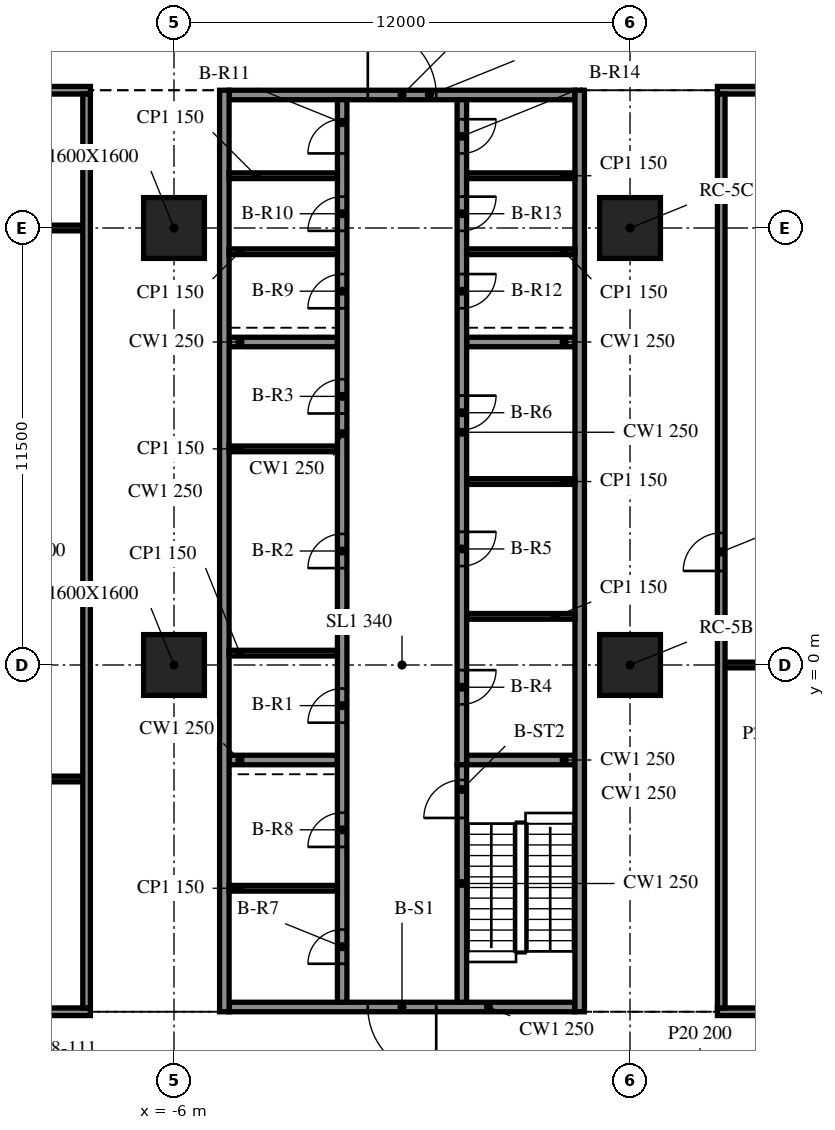
"""IFC4 building model, lengths in metres.
Left out: names, types, materials, properties, quantities, classifications, styles, units other than length and angle.
Written with IfcOpenShell. Run it as: python <this file> out.ifc"""

import sys

from ifc_helpers import new_model, si_unit, direction, frame, frame_2d, origin, origin_2d, place, context, subcontext, project, spatial, rectangle, extrude, element, fill, save


model = new_model("IFC4")
c1 = context("Model", 3, precision=1e-05, world=origin(), true_north=direction((0.0, 1.0)))
c2 = subcontext(c1, "Body", "Model", "MODEL_VIEW")
j1 = project(units=[si_unit("LENGTHUNIT", "METRE"), si_unit("PLANEANGLEUNIT", "RADIAN")], contexts=[c1])
p1 = place(None, origin())
s1 = spatial("IfcSite", under=j1, at=p1, CompositionType="ELEMENT")
p2 = place(p1, origin())
s2 = spatial("IfcBuilding", under=s1, at=p2, CompositionType="ELEMENT")
p3 = place(p2, frame((0.0, 0.0, 37.3)))
s3 = spatial("IfcBuildingStorey", under=s2, at=p3, CompositionType="ELEMENT", Elevation=37.3)
for number, where, z_axis, x_axis in (
    (1, (-6.0, 0.0, -0.34), (0.0, 0.0, 1.0), (1.0, 0.0, 0.0)),
    (2, (-6.0, 11.5, -0.34), (0.0, 0.0, 1.0), (1.0, 0.0, 0.0)),
    (3, (6.0, 0.0, -0.34), (0.0, 0.0, 1.0), (1.0, 0.0, 0.0)),
    (4, (6.0, 11.5, -0.34), (0.0, 0.0, 1.0), (1.0, 0.0, 0.0)),
):
    element("IfcColumn", number, at=place(p3, frame(where, z_axis=z_axis, x_axis=x_axis)), inside=s3, PredefinedType="COLUMN", context=c2, shape_type="SweptSolid", body=[
        extrude(rectangle(XDim=1.6, YDim=1.6, at=origin_2d()), origin(), (0.0, 0.0, 1.0), 4.09),
    ])
for number, where, z_axis, x_axis in (
    (5, (-4.675, 15.125, 0.0), (0.0, 0.0, 1.0), (0.0, -1.0, 0.0)),
    (6, (4.675, -9.125, 0.0), (0.0, 0.0, 1.0), (0.0, 1.0, 0.0)),
):
    element("IfcWall", number, at=place(p3, frame(where, z_axis=z_axis, x_axis=x_axis)), inside=s3, PredefinedType="SOLIDWALL", context=c2, shape_type="SweptSolid", body=[
        extrude(rectangle(XDim=24.25, YDim=0.25, at=frame_2d((12.125, 0.0))), origin(), (0.0, 0.0, 1.0), 3.75),
    ])
p4 = place(p3, frame((4.55, -9.0, 0.0), z_axis=(0.0, 0.0, 1.0), x_axis=(-1.0, 0.0, 0.0)))
e7 = element("IfcWall", 7, at=p4, inside=s3, PredefinedType="SOLIDWALL", context=c2, shape_type="SweptSolid", body=[
    extrude(rectangle(XDim=9.1, YDim=0.25, at=frame_2d((4.55, 0.0))), origin(), (0.0, 0.0, 1.0), 3.75),
])
p5 = place(p4, frame((3.65, 0.0, 0.0)))
e8 = element("IfcOpeningElement", 8, at=p5, cuts=e7, PredefinedType="OPENING", context=c2, shape_type="SweptSolid", body=[
    extrude(rectangle(XDim=1.8, YDim=2.1, at=frame_2d((0.9, 1.05))), frame((0.0, 0.135, 0.0), z_axis=(0.0, -1.0, 0.0), x_axis=(1.0, 0.0, 0.0)), (0.0, 0.0, 1.0), 0.27),
])
p6 = place(p3, frame((-4.55, 15.0, 0.0), z_axis=(0.0, 0.0, 1.0), x_axis=(1.0, 0.0, 0.0)))
e9 = element("IfcWall", 9, at=p6, inside=s3, PredefinedType="SOLIDWALL", context=c2, shape_type="SweptSolid", body=[
    extrude(rectangle(XDim=9.1, YDim=0.25, at=frame_2d((4.55, 0.0))), origin(), (0.0, 0.0, 1.0), 3.75),
])
p7 = place(p6, frame((3.65, 0.0, 0.0)))
e10 = element("IfcOpeningElement", 10, at=p7, cuts=e9, PredefinedType="OPENING", context=c2, shape_type="SweptSolid", body=[
    extrude(rectangle(XDim=1.8, YDim=2.1, at=frame_2d((0.9, 1.05))), frame((0.0, 0.135, 0.0), z_axis=(0.0, -1.0, 0.0), x_axis=(1.0, 0.0, 0.0)), (0.0, 0.0, 1.0), 0.27),
])
p8 = place(p3, frame((-1.575, -8.875, 0.0), z_axis=(0.0, 0.0, 1.0), x_axis=(0.0, 1.0, 0.0)))
e11 = element("IfcWall", 11, at=p8, inside=s3, PredefinedType="SOLIDWALL", context=c2, shape_type="SweptSolid", body=[
    extrude(rectangle(XDim=23.75, YDim=0.25, at=frame_2d((11.875, 0.0))), origin(), (0.0, 0.0, 1.0), 3.75),
])
p9 = place(p8, frame((7.356, 0.0, 0.0)))
e12 = element("IfcOpeningElement", 12, at=p9, cuts=e11, PredefinedType="OPENING", context=c2, shape_type="SweptSolid", body=[
    extrude(rectangle(XDim=0.9, YDim=2.1, at=frame_2d((0.45, 1.05))), frame((0.0, 0.135, 0.0), z_axis=(0.0, -1.0, 0.0), x_axis=(1.0, 0.0, 0.0)), (0.0, 0.0, 1.0), 0.27),
])
p10 = place(p8, frame((11.425, 0.0, 0.0)))
e13 = element("IfcOpeningElement", 13, at=p10, cuts=e11, PredefinedType="OPENING", context=c2, shape_type="SweptSolid", body=[
    extrude(rectangle(XDim=0.9, YDim=2.1, at=frame_2d((0.45, 1.05))), frame((0.0, 0.135, 0.0), z_axis=(0.0, -1.0, 0.0), x_axis=(1.0, 0.0, 0.0)), (0.0, 0.0, 1.0), 0.27),
])
p11 = place(p8, frame((15.494, 0.0, 0.0)))
e14 = element("IfcOpeningElement", 14, at=p11, cuts=e11, PredefinedType="OPENING", context=c2, shape_type="SweptSolid", body=[
    extrude(rectangle(XDim=0.9, YDim=2.1, at=frame_2d((0.45, 1.05))), frame((0.0, 0.135, 0.0), z_axis=(0.0, -1.0, 0.0), x_axis=(1.0, 0.0, 0.0)), (0.0, 0.0, 1.0), 0.27),
])
p12 = place(p8, frame((1.012, 0.0, 0.0)))
e15 = element("IfcOpeningElement", 15, at=p12, cuts=e11, PredefinedType="OPENING", context=c2, shape_type="SweptSolid", body=[
    extrude(rectangle(XDim=0.9, YDim=2.1, at=frame_2d((0.45, 1.05))), frame((0.0, 0.135, 0.0), z_axis=(0.0, -1.0, 0.0), x_axis=(1.0, 0.0, 0.0)), (0.0, 0.0, 1.0), 0.27),
])
p13 = place(p8, frame((4.087, 0.0, 0.0)))
e16 = element("IfcOpeningElement", 16, at=p13, cuts=e11, PredefinedType="OPENING", context=c2, shape_type="SweptSolid", body=[
    extrude(rectangle(XDim=0.9, YDim=2.1, at=frame_2d((0.45, 1.05))), frame((0.0, 0.135, 0.0), z_axis=(0.0, -1.0, 0.0), x_axis=(1.0, 0.0, 0.0)), (0.0, 0.0, 1.0), 0.27),
])
p14 = place(p8, frame((18.262, 0.0, 0.0)))
e17 = element("IfcOpeningElement", 17, at=p14, cuts=e11, PredefinedType="OPENING", context=c2, shape_type="SweptSolid", body=[
    extrude(rectangle(XDim=0.9, YDim=2.1, at=frame_2d((0.45, 1.05))), frame((0.0, 0.135, 0.0), z_axis=(0.0, -1.0, 0.0), x_axis=(1.0, 0.0, 0.0)), (0.0, 0.0, 1.0), 0.27),
])
p15 = place(p8, frame((20.3, 0.0, 0.0)))
e18 = element("IfcOpeningElement", 18, at=p15, cuts=e11, PredefinedType="OPENING", context=c2, shape_type="SweptSolid", body=[
    extrude(rectangle(XDim=0.9, YDim=2.1, at=frame_2d((0.45, 1.05))), frame((0.0, 0.135, 0.0), z_axis=(0.0, -1.0, 0.0), x_axis=(1.0, 0.0, 0.0)), (0.0, 0.0, 1.0), 0.27),
])
p16 = place(p8, frame((22.337, 0.0, 0.0)))
e19 = element("IfcOpeningElement", 19, at=p16, cuts=e11, PredefinedType="OPENING", context=c2, shape_type="SweptSolid", body=[
    extrude(rectangle(XDim=0.9, YDim=2.1, at=frame_2d((0.45, 1.05))), frame((0.0, 0.135, 0.0), z_axis=(0.0, -1.0, 0.0), x_axis=(1.0, 0.0, 0.0)), (0.0, 0.0, 1.0), 0.27),
])
p17 = place(p3, frame((1.575, -8.875, 0.0), z_axis=(0.0, 0.0, 1.0), x_axis=(0.0, 1.0, 0.0)))
e20 = element("IfcWall", 20, at=p17, inside=s3, PredefinedType="SOLIDWALL", context=c2, shape_type="SweptSolid", body=[
    extrude(rectangle(XDim=6.25, YDim=0.25, at=frame_2d((3.125, 0.0))), origin(), (0.0, 0.0, 1.0), 3.75),
])
p18 = place(p17, frame((4.85, 0.0, 0.0)))
e21 = element("IfcOpeningElement", 21, at=p18, cuts=e20, PredefinedType="OPENING", context=c2, shape_type="SweptSolid", body=[
    extrude(rectangle(XDim=1.0, YDim=2.1, at=frame_2d((0.5, 1.05))), frame((0.0, 0.135, 0.0), z_axis=(0.0, -1.0, 0.0), x_axis=(1.0, 0.0, 0.0)), (0.0, 0.0, 1.0), 0.27),
])
p19 = place(p3, frame((1.575, 14.875, 0.0), z_axis=(0.0, 0.0, 1.0), x_axis=(0.0, -1.0, 0.0)))
e22 = element("IfcWall", 22, at=p19, inside=s3, PredefinedType="SOLIDWALL", context=c2, shape_type="SweptSolid", body=[
    extrude(rectangle(XDim=17.5, YDim=0.25, at=frame_2d((8.75, 0.0))), origin(), (0.0, 0.0, 1.0), 3.75),
])
p20 = place(p19, frame((15.01, 0.0, 0.0)))
e23 = element("IfcOpeningElement", 23, at=p20, cuts=e22, PredefinedType="OPENING", context=c2, shape_type="SweptSolid", body=[
    extrude(rectangle(XDim=0.9, YDim=2.1, at=frame_2d((0.45, 1.05))), frame((0.0, 0.135, 0.0), z_axis=(0.0, -1.0, 0.0), x_axis=(1.0, 0.0, 0.0)), (0.0, 0.0, 1.0), 0.27),
])
p21 = place(p19, frame((11.371, 0.0, 0.0)))
e24 = element("IfcOpeningElement", 24, at=p21, cuts=e22, PredefinedType="OPENING", context=c2, shape_type="SweptSolid", body=[
    extrude(rectangle(XDim=0.9, YDim=2.1, at=frame_2d((0.45, 1.05))), frame((0.0, 0.135, 0.0), z_axis=(0.0, -1.0, 0.0), x_axis=(1.0, 0.0, 0.0)), (0.0, 0.0, 1.0), 0.27),
])
p22 = place(p19, frame((7.786, 0.0, 0.0)))
e25 = element("IfcOpeningElement", 25, at=p22, cuts=e22, PredefinedType="OPENING", context=c2, shape_type="SweptSolid", body=[
    extrude(rectangle(XDim=0.9, YDim=2.1, at=frame_2d((0.45, 1.05))), frame((0.0, 0.135, 0.0), z_axis=(0.0, -1.0, 0.0), x_axis=(1.0, 0.0, 0.0)), (0.0, 0.0, 1.0), 0.27),
])
p23 = place(p19, frame((4.587, 0.0, 0.0)))
e26 = element("IfcOpeningElement", 26, at=p23, cuts=e22, PredefinedType="OPENING", context=c2, shape_type="SweptSolid", body=[
    extrude(rectangle(XDim=0.9, YDim=2.1, at=frame_2d((0.45, 1.05))), frame((0.0, 0.135, 0.0), z_axis=(0.0, -1.0, 0.0), x_axis=(1.0, 0.0, 0.0)), (0.0, 0.0, 1.0), 0.27),
])
p24 = place(p19, frame((2.55, 0.0, 0.0)))
e27 = element("IfcOpeningElement", 27, at=p24, cuts=e22, PredefinedType="OPENING", context=c2, shape_type="SweptSolid", body=[
    extrude(rectangle(XDim=0.9, YDim=2.1, at=frame_2d((0.45, 1.05))), frame((0.0, 0.135, 0.0), z_axis=(0.0, -1.0, 0.0), x_axis=(1.0, 0.0, 0.0)), (0.0, 0.0, 1.0), 0.27),
])
p25 = place(p19, frame((0.512, 0.0, 0.0)))
e28 = element("IfcOpeningElement", 28, at=p25, cuts=e22, PredefinedType="OPENING", context=c2, shape_type="SweptSolid", body=[
    extrude(rectangle(XDim=0.9, YDim=2.1, at=frame_2d((0.45, 1.05))), frame((0.0, 0.135, 0.0), z_axis=(0.0, -1.0, 0.0), x_axis=(1.0, 0.0, 0.0)), (0.0, 0.0, 1.0), 0.27),
])
for number, where, z_axis, x_axis in (
    (29, (-4.55, -2.5, 0.0), (0.0, 0.0, 1.0), (1.0, 0.0, 0.0)),
    (30, (-4.55, 8.5, 0.0), (0.0, 0.0, 1.0), (1.0, 0.0, 0.0)),
    (31, (1.7, -2.5, 0.0), (0.0, 0.0, 1.0), (1.0, 0.0, 0.0)),
    (32, (1.7, 8.5, 0.0), (0.0, 0.0, 1.0), (1.0, 0.0, 0.0)),
):
    element("IfcWall", number, at=place(p3, frame(where, z_axis=z_axis, x_axis=x_axis)), inside=s3, PredefinedType="SOLIDWALL", context=c2, shape_type="SweptSolid", body=[
        extrude(rectangle(XDim=2.85, YDim=0.25, at=frame_2d((1.425, 0.0))), origin(), (0.0, 0.0, 1.0), 3.75),
    ])
for number, where, z_axis, x_axis in (
    (33, (-4.55, 0.312, 0.0), (0.0, 0.0, 1.0), (1.0, 0.0, 0.0)),
    (34, (-4.55, 5.688, 0.0), (0.0, 0.0, 1.0), (1.0, 0.0, 0.0)),
    (35, (1.7, 1.28, 0.0), (0.0, 0.0, 1.0), (1.0, 0.0, 0.0)),
    (36, (1.7, 4.827, 0.0), (0.0, 0.0, 1.0), (1.0, 0.0, 0.0)),
    (37, (-4.55, -5.875, 0.0), (0.0, 0.0, 1.0), (1.0, 0.0, 0.0)),
    (38, (-4.55, 10.875, 0.0), (0.0, 0.0, 1.0), (1.0, 0.0, 0.0)),
    (39, (-4.55, 12.875, 0.0), (0.0, 0.0, 1.0), (1.0, 0.0, 0.0)),
    (40, (1.7, 10.875, 0.0), (0.0, 0.0, 1.0), (1.0, 0.0, 0.0)),
    (41, (1.7, 12.875, 0.0), (0.0, 0.0, 1.0), (1.0, 0.0, 0.0)),
):
    element("IfcWall", number, at=place(p3, frame(where, z_axis=z_axis, x_axis=x_axis)), inside=s3, PredefinedType="PARTITIONING", context=c2, shape_type="SweptSolid", body=[
        extrude(rectangle(XDim=2.85, YDim=0.15, at=frame_2d((1.425, 0.0))), origin(), (0.0, 0.0, 1.0), 3.75),
    ])
p26 = place(p3, frame((-15.9, -9.125, 0.0), z_axis=(0.0, 0.0, 1.0), x_axis=(1.0, 0.0, 0.0)))
e42 = element("IfcWall", 42, at=p26, inside=s3, PredefinedType="PARTITIONING", context=c2, shape_type="SweptSolid", body=[
    extrude(rectangle(XDim=7.7, YDim=0.2, at=frame_2d((3.85, 0.0))), origin(), (0.0, 0.0, 1.0), 3.75),
])
p27 = place(p26, frame((3.3, 0.0, 0.0)))
e43 = element("IfcOpeningElement", 43, at=p27, cuts=e42, PredefinedType="OPENING", context=c2, shape_type="SweptSolid", body=[
    extrude(rectangle(XDim=1.2, YDim=2.1, at=frame_2d((0.6, 1.05))), frame((0.0, 0.11, 0.0), z_axis=(0.0, -1.0, 0.0), x_axis=(1.0, 0.0, 0.0)), (0.0, 0.0, 1.0), 0.22),
])
p28 = place(p3, frame((8.3, -9.125, 0.0), z_axis=(0.0, 0.0, 1.0), x_axis=(1.0, 0.0, 0.0)))
e44 = element("IfcWall", 44, at=p28, inside=s3, PredefinedType="PARTITIONING", context=c2, shape_type="SweptSolid", body=[
    extrude(rectangle(XDim=7.3, YDim=0.2, at=frame_2d((3.65, 0.0))), origin(), (0.0, 0.0, 1.0), 3.75),
])
p29 = place(p28, frame((3.1, 0.0, 0.0)))
e45 = element("IfcOpeningElement", 45, at=p29, cuts=e44, PredefinedType="OPENING", context=c2, shape_type="SweptSolid", body=[
    extrude(rectangle(XDim=1.2, YDim=2.1, at=frame_2d((0.6, 1.05))), frame((0.0, 0.11, 0.0), z_axis=(0.0, -1.0, 0.0), x_axis=(1.0, 0.0, 0.0)), (0.0, 0.0, 1.0), 0.22),
])
p30 = place(p3, frame((-15.7, -3.0, 0.0), z_axis=(0.0, 0.0, 1.0), x_axis=(1.0, 0.0, 0.0)))
e46 = element("IfcWall", 46, at=p30, inside=s3, PredefinedType="PARTITIONING", context=c2, shape_type="SweptSolid", body=[
    extrude(rectangle(XDim=7.3, YDim=0.15, at=frame_2d((3.65, 0.0))), origin(), (0.0, 0.0, 1.0), 3.75),
])
p31 = place(p3, frame((8.5, 0.0, 0.0), z_axis=(0.0, 0.0, 1.0), x_axis=(1.0, 0.0, 0.0)))
e47 = element("IfcWall", 47, at=p31, inside=s3, PredefinedType="PARTITIONING", context=c2, shape_type="SweptSolid", body=[
    extrude(rectangle(XDim=6.9, YDim=0.15, at=frame_2d((3.45, 0.0))), origin(), (0.0, 0.0, 1.0), 3.75),
])
p32 = place(p3, frame((-15.7, 11.5, 0.0), z_axis=(0.0, 0.0, 1.0), x_axis=(1.0, 0.0, 0.0)))
e48 = element("IfcWall", 48, at=p32, inside=s3, PredefinedType="PARTITIONING", context=c2, shape_type="SweptSolid", body=[
    extrude(rectangle(XDim=7.3, YDim=0.15, at=frame_2d((3.65, 0.0))), origin(), (0.0, 0.0, 1.0), 3.75),
])
p33 = place(p3, frame((-15.9, 15.125, 0.0), z_axis=(0.0, 0.0, 1.0), x_axis=(1.0, 0.0, 0.0)))
e49 = element("IfcWall", 49, at=p33, inside=s3, PredefinedType="PARTITIONING", context=c2, shape_type="SweptSolid", body=[
    extrude(rectangle(XDim=7.7, YDim=0.2, at=frame_2d((3.85, 0.0))), origin(), (0.0, 0.0, 1.0), 3.75),
])
p34 = place(p33, frame((3.3, 0.0, 0.0)))
e50 = element("IfcOpeningElement", 50, at=p34, cuts=e49, PredefinedType="OPENING", context=c2, shape_type="SweptSolid", body=[
    extrude(rectangle(XDim=1.0, YDim=2.1, at=frame_2d((0.5, 1.05))), frame((0.0, 0.11, 0.0), z_axis=(0.0, -1.0, 0.0), x_axis=(1.0, 0.0, 0.0)), (0.0, 0.0, 1.0), 0.22),
])
p35 = place(p3, frame((8.3, 15.125, 0.0), z_axis=(0.0, 0.0, 1.0), x_axis=(1.0, 0.0, 0.0)))
e51 = element("IfcWall", 51, at=p35, inside=s3, PredefinedType="PARTITIONING", context=c2, shape_type="SweptSolid", body=[
    extrude(rectangle(XDim=7.3, YDim=0.2, at=frame_2d((3.65, 0.0))), origin(), (0.0, 0.0, 1.0), 3.75),
])
p36 = place(p3, frame((-8.3, -9.025, 0.0), z_axis=(0.0, 0.0, 1.0), x_axis=(0.0, 1.0, 0.0)))
e52 = element("IfcWall", 52, at=p36, inside=s3, PredefinedType="PARTITIONING", context=c2, shape_type="SweptSolid", body=[
    extrude(rectangle(XDim=24.05, YDim=0.2, at=frame_2d((12.025, 0.0))), origin(), (0.0, 0.0, 1.0), 3.75),
])
p37 = place(p3, frame((8.4, -9.025, 0.0), z_axis=(0.0, 0.0, 1.0), x_axis=(0.0, 1.0, 0.0)))
e53 = element("IfcWall", 53, at=p37, inside=s3, PredefinedType="PARTITIONING", context=c2, shape_type="SweptSolid", body=[
    extrude(rectangle(XDim=24.05, YDim=0.2, at=frame_2d((12.025, 0.0))), origin(), (0.0, 0.0, 1.0), 3.75),
])
p38 = place(p37, frame((11.5, 0.0, 0.0)))
e54 = element("IfcOpeningElement", 54, at=p38, cuts=e53, PredefinedType="OPENING", context=c2, shape_type="SweptSolid", body=[
    extrude(rectangle(XDim=1.0, YDim=2.1, at=frame_2d((0.5, 1.05))), frame((0.0, 0.11, 0.0), z_axis=(0.0, -1.0, 0.0), x_axis=(1.0, 0.0, 0.0)), (0.0, 0.0, 1.0), 0.22),
])
p39 = place(p5, origin())
e55 = element("IfcDoor", 55, at=p39, inside=s3, OperationType="DOUBLE_DOOR_SINGLE_SWING", PredefinedType="DOOR", context=c2, shape_type="SweptSolid", body=[
    extrude(rectangle(XDim=1.8, YDim=2.1, at=frame_2d((0.9, 1.05))), frame((0.0, 0.025, 0.0), z_axis=(0.0, -1.0, 0.0), x_axis=(1.0, 0.0, 0.0)), (0.0, 0.0, 1.0), 0.05),
])
fill(e8, e55)
p40 = place(p7, origin())
e56 = element("IfcDoor", 56, at=p40, inside=s3, OperationType="DOUBLE_DOOR_SINGLE_SWING", PredefinedType="DOOR", context=c2, shape_type="SweptSolid", body=[
    extrude(rectangle(XDim=1.8, YDim=2.1, at=frame_2d((0.9, 1.05))), frame((0.0, 0.025, 0.0), z_axis=(0.0, -1.0, 0.0), x_axis=(1.0, 0.0, 0.0)), (0.0, 0.0, 1.0), 0.05),
])
fill(e10, e56)
p41 = place(p9, origin())
e57 = element("IfcDoor", 57, at=p41, inside=s3, OperationType="SINGLE_SWING_LEFT", PredefinedType="DOOR", context=c2, shape_type="SweptSolid", body=[
    extrude(rectangle(XDim=0.9, YDim=2.1, at=frame_2d((0.45, 1.05))), frame((0.0, 0.025, 0.0), z_axis=(0.0, -1.0, 0.0), x_axis=(1.0, 0.0, 0.0)), (0.0, 0.0, 1.0), 0.05),
])
fill(e12, e57)
p42 = place(p10, origin())
e58 = element("IfcDoor", 58, at=p42, inside=s3, OperationType="SINGLE_SWING_RIGHT", PredefinedType="DOOR", context=c2, shape_type="SweptSolid", body=[
    extrude(rectangle(XDim=0.9, YDim=2.1, at=frame_2d((0.45, 1.05))), frame((0.0, 0.025, 0.0), z_axis=(0.0, -1.0, 0.0), x_axis=(1.0, 0.0, 0.0)), (0.0, 0.0, 1.0), 0.05),
])
fill(e13, e58)
p43 = place(p11, origin())
e59 = element("IfcDoor", 59, at=p43, inside=s3, OperationType="SINGLE_SWING_LEFT", PredefinedType="DOOR", context=c2, shape_type="SweptSolid", body=[
    extrude(rectangle(XDim=0.9, YDim=2.1, at=frame_2d((0.45, 1.05))), frame((0.0, 0.025, 0.0), z_axis=(0.0, -1.0, 0.0), x_axis=(1.0, 0.0, 0.0)), (0.0, 0.0, 1.0), 0.05),
])
fill(e14, e59)
p44 = place(p20, origin())
e60 = element("IfcDoor", 60, at=p44, inside=s3, OperationType="SINGLE_SWING_RIGHT", PredefinedType="DOOR", context=c2, shape_type="SweptSolid", body=[
    extrude(rectangle(XDim=0.9, YDim=2.1, at=frame_2d((0.45, 1.05))), frame((0.0, 0.025, 0.0), z_axis=(0.0, -1.0, 0.0), x_axis=(1.0, 0.0, 0.0)), (0.0, 0.0, 1.0), 0.05),
])
fill(e23, e60)
p45 = place(p21, origin())
e61 = element("IfcDoor", 61, at=p45, inside=s3, OperationType="SINGLE_SWING_LEFT", PredefinedType="DOOR", context=c2, shape_type="SweptSolid", body=[
    extrude(rectangle(XDim=0.9, YDim=2.1, at=frame_2d((0.45, 1.05))), frame((0.0, 0.025, 0.0), z_axis=(0.0, -1.0, 0.0), x_axis=(1.0, 0.0, 0.0)), (0.0, 0.0, 1.0), 0.05),
])
fill(e24, e61)
p46 = place(p22, origin())
e62 = element("IfcDoor", 62, at=p46, inside=s3, OperationType="SINGLE_SWING_RIGHT", PredefinedType="DOOR", context=c2, shape_type="SweptSolid", body=[
    extrude(rectangle(XDim=0.9, YDim=2.1, at=frame_2d((0.45, 1.05))), frame((0.0, 0.025, 0.0), z_axis=(0.0, -1.0, 0.0), x_axis=(1.0, 0.0, 0.0)), (0.0, 0.0, 1.0), 0.05),
])
fill(e25, e62)
p47 = place(p12, origin())
e63 = element("IfcDoor", 63, at=p47, inside=s3, OperationType="SINGLE_SWING_LEFT", PredefinedType="DOOR", context=c2, shape_type="SweptSolid", body=[
    extrude(rectangle(XDim=0.9, YDim=2.1, at=frame_2d((0.45, 1.05))), frame((0.0, 0.025, 0.0), z_axis=(0.0, -1.0, 0.0), x_axis=(1.0, 0.0, 0.0)), (0.0, 0.0, 1.0), 0.05),
])
fill(e15, e63)
p48 = place(p13, origin())
e64 = element("IfcDoor", 64, at=p48, inside=s3, OperationType="SINGLE_SWING_RIGHT", PredefinedType="DOOR", context=c2, shape_type="SweptSolid", body=[
    extrude(rectangle(XDim=0.9, YDim=2.1, at=frame_2d((0.45, 1.05))), frame((0.0, 0.025, 0.0), z_axis=(0.0, -1.0, 0.0), x_axis=(1.0, 0.0, 0.0)), (0.0, 0.0, 1.0), 0.05),
])
fill(e16, e64)
p49 = place(p14, origin())
e65 = element("IfcDoor", 65, at=p49, inside=s3, OperationType="SINGLE_SWING_LEFT", PredefinedType="DOOR", context=c2, shape_type="SweptSolid", body=[
    extrude(rectangle(XDim=0.9, YDim=2.1, at=frame_2d((0.45, 1.05))), frame((0.0, 0.025, 0.0), z_axis=(0.0, -1.0, 0.0), x_axis=(1.0, 0.0, 0.0)), (0.0, 0.0, 1.0), 0.05),
])
fill(e17, e65)
p50 = place(p15, origin())
e66 = element("IfcDoor", 66, at=p50, inside=s3, OperationType="SINGLE_SWING_RIGHT", PredefinedType="DOOR", context=c2, shape_type="SweptSolid", body=[
    extrude(rectangle(XDim=0.9, YDim=2.1, at=frame_2d((0.45, 1.05))), frame((0.0, 0.025, 0.0), z_axis=(0.0, -1.0, 0.0), x_axis=(1.0, 0.0, 0.0)), (0.0, 0.0, 1.0), 0.05),
])
fill(e18, e66)
p51 = place(p16, origin())
e67 = element("IfcDoor", 67, at=p51, inside=s3, OperationType="SINGLE_SWING_LEFT", PredefinedType="DOOR", context=c2, shape_type="SweptSolid", body=[
    extrude(rectangle(XDim=0.9, YDim=2.1, at=frame_2d((0.45, 1.05))), frame((0.0, 0.025, 0.0), z_axis=(0.0, -1.0, 0.0), x_axis=(1.0, 0.0, 0.0)), (0.0, 0.0, 1.0), 0.05),
])
fill(e19, e67)
p52 = place(p23, origin())
e68 = element("IfcDoor", 68, at=p52, inside=s3, OperationType="SINGLE_SWING_RIGHT", PredefinedType="DOOR", context=c2, shape_type="SweptSolid", body=[
    extrude(rectangle(XDim=0.9, YDim=2.1, at=frame_2d((0.45, 1.05))), frame((0.0, 0.025, 0.0), z_axis=(0.0, -1.0, 0.0), x_axis=(1.0, 0.0, 0.0)), (0.0, 0.0, 1.0), 0.05),
])
fill(e26, e68)
p53 = place(p24, origin())
e69 = element("IfcDoor", 69, at=p53, inside=s3, OperationType="SINGLE_SWING_LEFT", PredefinedType="DOOR", context=c2, shape_type="SweptSolid", body=[
    extrude(rectangle(XDim=0.9, YDim=2.1, at=frame_2d((0.45, 1.05))), frame((0.0, 0.025, 0.0), z_axis=(0.0, -1.0, 0.0), x_axis=(1.0, 0.0, 0.0)), (0.0, 0.0, 1.0), 0.05),
])
fill(e27, e69)
p54 = place(p25, origin())
e70 = element("IfcDoor", 70, at=p54, inside=s3, OperationType="SINGLE_SWING_RIGHT", PredefinedType="DOOR", context=c2, shape_type="SweptSolid", body=[
    extrude(rectangle(XDim=0.9, YDim=2.1, at=frame_2d((0.45, 1.05))), frame((0.0, 0.025, 0.0), z_axis=(0.0, -1.0, 0.0), x_axis=(1.0, 0.0, 0.0)), (0.0, 0.0, 1.0), 0.05),
])
fill(e28, e70)
p55 = place(p18, origin())
e71 = element("IfcDoor", 71, at=p55, inside=s3, OperationType="SINGLE_SWING_LEFT", PredefinedType="DOOR", context=c2, shape_type="SweptSolid", body=[
    extrude(rectangle(XDim=1.0, YDim=2.1, at=frame_2d((0.5, 1.05))), frame((0.0, 0.025, 0.0), z_axis=(0.0, -1.0, 0.0), x_axis=(1.0, 0.0, 0.0)), (0.0, 0.0, 1.0), 0.05),
])
fill(e21, e71)
p56 = place(p38, origin())
e72 = element("IfcDoor", 72, at=p56, inside=s3, OperationType="SINGLE_SWING_RIGHT", PredefinedType="DOOR", context=c2, shape_type="SweptSolid", body=[
    extrude(rectangle(XDim=1.0, YDim=2.1, at=frame_2d((0.5, 1.05))), frame((0.0, 0.025, 0.0), z_axis=(0.0, -1.0, 0.0), x_axis=(1.0, 0.0, 0.0)), (0.0, 0.0, 1.0), 0.05),
])
fill(e54, e72)
save(model, sys.argv[1])
